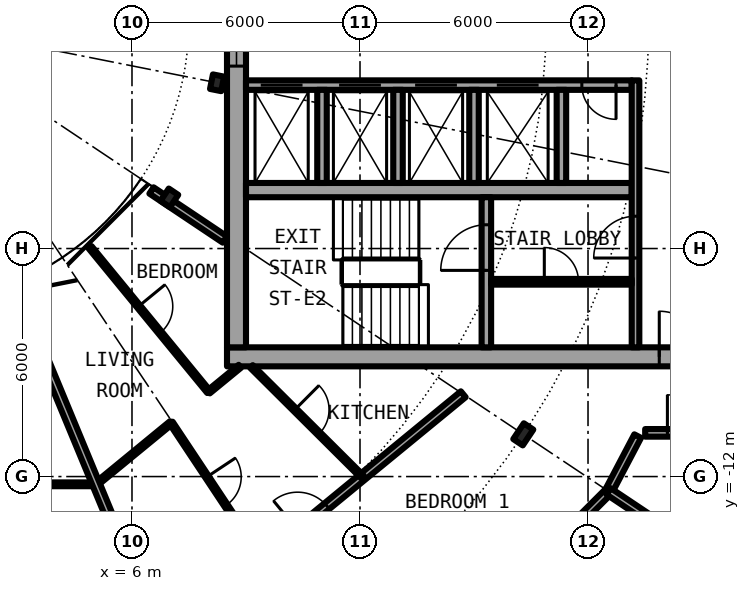
"""IFC4 building model, lengths in metres.
Left out: names, types, materials, properties, quantities, classifications, styles, units other than length and angle.
Written with IfcOpenShell. Run it as: python <this file> out.ifc"""

import sys

from ifc_helpers import new_model, si_unit, direction, frame, frame_2d, origin, origin_2d, place, context, subcontext, project, spatial, rectangle, i_section, extrude, element, fill, save


model = new_model("IFC4")
c1 = context("Model", 3, precision=1e-05, world=origin(), true_north=direction((0.0, 1.0)))
c2 = subcontext(c1, "Body", "Model", "MODEL_VIEW")
j1 = project(units=[si_unit("LENGTHUNIT", "METRE"), si_unit("PLANEANGLEUNIT", "RADIAN")], contexts=[c1])
p1 = place(None, origin())
s1 = spatial("IfcSite", under=j1, at=p1, CompositionType="ELEMENT")
p2 = place(p1, origin())
s2 = spatial("IfcBuilding", under=s1, at=p2, CompositionType="ELEMENT")
p3 = place(p2, frame((0.0, 0.0, 173.8)))
s3 = spatial("IfcBuildingStorey", under=s2, at=p3, CompositionType="ELEMENT", Elevation=173.8)
p4 = place(p3, frame((16.297, -10.889, 0.0), z_axis=(0.0, 0.0, 1.0), x_axis=(0.831469612303, -0.55557023302, 0.0)))
e1 = element("IfcColumn", 1, at=p4, inside=s3, PredefinedType="COLUMN", context=c2, shape_type="SweptSolid", body=[
    extrude(i_section(OverallWidth=0.3, OverallDepth=0.5, WebThickness=0.014, FlangeThickness=0.028, FilletRadius=0.027, at=origin_2d()), origin(), (0.0, 0.0, 1.0), 3.05),
])
for number, where, z_axis, x_axis in (
    (2, (6.984, -4.667, 0.0), (0.0, 0.0, 1.0), (0.831, -0.556, 0.0)),
    (3, (8.239, -1.639, 0.0), (0.0, 0.0, 1.0), (0.981, -0.195, 0.0)),
):
    element("IfcColumn", number, at=place(p3, frame(where, z_axis=z_axis, x_axis=x_axis)), inside=s3, PredefinedType="COLUMN", context=c2, shape_type="SweptSolid", body=[
        extrude(i_section(OverallWidth=0.3, OverallDepth=0.39, WebThickness=0.011, FlangeThickness=0.019, FilletRadius=0.027, at=origin_2d()), origin(), (0.0, 0.0, 1.0), 3.05),
    ])
p5 = place(p3, frame((8.5, -8.85, 0.0), z_axis=(0.0, 0.0, 1.0), x_axis=(1.0, 0.0, 0.0)))
e4 = element("IfcWall", 4, at=p5, inside=s3, PredefinedType="SHEAR", context=c2, shape_type="SweptSolid", body=[
    extrude(rectangle(XDim=13.6, YDim=0.5, at=frame_2d((6.8, 0.0))), origin(), (0.0, 0.0, 1.0), 3.05),
])
p6 = place(p5, frame((11.375, 0.0, 0.0)))
e5 = element("IfcOpeningElement", 5, at=p6, cuts=e4, PredefinedType="OPENING", context=c2, shape_type="SweptSolid", body=[
    extrude(rectangle(XDim=1.2, YDim=2.3, at=frame_2d((0.6, 1.15))), frame((0.0, 0.26, 0.0), z_axis=(0.0, -1.0, 0.0), x_axis=(1.0, 0.0, 0.0)), (0.0, 0.0, 1.0), 0.52),
])
p7 = place(p3, frame((8.75, -8.6, 0.0), z_axis=(0.0, 0.0, 1.0), x_axis=(0.0, 1.0, 0.0)))
e6 = element("IfcWall", 6, at=p7, inside=s3, PredefinedType="SHEAR", context=c2, shape_type="SweptSolid", body=[
    extrude(rectangle(XDim=17.2, YDim=0.5, at=frame_2d((8.6, 0.0))), origin(), (0.0, 0.0, 1.0), 3.05),
])
p8 = place(p7, frame((7.4, 0.0, 0.1)))
e7 = element("IfcOpeningElement", 7, at=p8, cuts=e6, PredefinedType="OPENING", context=c2, shape_type="SweptSolid", body=[
    extrude(rectangle(XDim=2.4, YDim=2.2, at=frame_2d((1.2, 1.1))), frame((0.0, 0.26, 0.0), z_axis=(0.0, -1.0, 0.0), x_axis=(1.0, 0.0, 0.0)), (0.0, 0.0, 1.0), 0.52),
])
p9 = place(p3, frame((19.15, -1.7, 0.0), z_axis=(0.0, 0.0, 1.0), x_axis=(-1.0, 0.0, 0.0)))
e8 = element("IfcWall", 8, at=p9, inside=s3, PredefinedType="SHEAR", context=c2, shape_type="SweptSolid", body=[
    extrude(rectangle(XDim=10.15, YDim=0.25, at=frame_2d((5.075, 0.0))), origin(), (0.0, 0.0, 1.0), 3.05),
])
p10 = place(p9, frame((8.663, 0.0, 0.0)))
e9 = element("IfcOpeningElement", 9, at=p10, cuts=e8, PredefinedType="OPENING", context=c2, shape_type="SweptSolid", body=[
    extrude(rectangle(XDim=1.1, YDim=2.3, at=frame_2d((0.55, 1.15))), frame((0.0, 0.135, 0.0), z_axis=(0.0, -1.0, 0.0), x_axis=(1.0, 0.0, 0.0)), (0.0, 0.0, 1.0), 0.27),
])
p11 = place(p9, frame((6.6, 0.0, 0.0)))
e10 = element("IfcOpeningElement", 10, at=p11, cuts=e8, PredefinedType="OPENING", context=c2, shape_type="SweptSolid", body=[
    extrude(rectangle(XDim=1.1, YDim=2.3, at=frame_2d((0.55, 1.15))), frame((0.0, 0.135, 0.0), z_axis=(0.0, -1.0, 0.0), x_axis=(1.0, 0.0, 0.0)), (0.0, 0.0, 1.0), 0.27),
])
p12 = place(p9, frame((4.6, 0.0, 0.0)))
e11 = element("IfcOpeningElement", 11, at=p12, cuts=e8, PredefinedType="OPENING", context=c2, shape_type="SweptSolid", body=[
    extrude(rectangle(XDim=1.1, YDim=2.3, at=frame_2d((0.55, 1.15))), frame((0.0, 0.135, 0.0), z_axis=(0.0, -1.0, 0.0), x_axis=(1.0, 0.0, 0.0)), (0.0, 0.0, 1.0), 0.27),
])
p13 = place(p9, frame((2.45, 0.0, 0.0)))
e12 = element("IfcOpeningElement", 12, at=p13, cuts=e8, PredefinedType="OPENING", context=c2, shape_type="SweptSolid", body=[
    extrude(rectangle(XDim=1.1, YDim=2.3, at=frame_2d((0.55, 1.15))), frame((0.0, 0.135, 0.0), z_axis=(0.0, -1.0, 0.0), x_axis=(1.0, 0.0, 0.0)), (0.0, 0.0, 1.0), 0.27),
])
p14 = place(p9, frame((0.413, 0.0, 0.0)))
e13 = element("IfcOpeningElement", 13, at=p14, cuts=e8, PredefinedType="OPENING", context=c2, shape_type="SweptSolid", body=[
    extrude(rectangle(XDim=0.9, YDim=2.3, at=frame_2d((0.45, 1.15))), frame((0.0, 0.135, 0.0), z_axis=(0.0, -1.0, 0.0), x_axis=(1.0, 0.0, 0.0)), (0.0, 0.0, 1.0), 0.27),
])
p15 = place(p3, frame((9.0, -4.462, 0.0), z_axis=(0.0, 0.0, 1.0), x_axis=(1.0, 0.0, 0.0)))
e14 = element("IfcWall", 14, at=p15, inside=s3, PredefinedType="SHEAR", context=c2, shape_type="SweptSolid", body=[
    extrude(rectangle(XDim=10.15, YDim=0.375, at=frame_2d((5.075, 0.0))), origin(), (0.0, 0.0, 1.0), 3.05),
])
p16 = place(p3, frame((15.325, -8.6, 0.0), z_axis=(0.0, 0.0, 1.0), x_axis=(0.0, 1.0, 0.0)))
e15 = element("IfcWall", 15, at=p16, inside=s3, PredefinedType="SHEAR", context=c2, shape_type="SweptSolid", body=[
    extrude(rectangle(XDim=3.95, YDim=0.25, at=frame_2d((1.975, 0.0))), origin(), (0.0, 0.0, 1.0), 3.05),
])
p17 = place(p16, frame((2.025, 0.0, 0.0)))
e16 = element("IfcOpeningElement", 16, at=p17, cuts=e15, PredefinedType="OPENING", context=c2, shape_type="SweptSolid", body=[
    extrude(rectangle(XDim=1.2, YDim=2.3, at=frame_2d((0.6, 1.15))), frame((0.0, 0.135, 0.0), z_axis=(0.0, -1.0, 0.0), x_axis=(1.0, 0.0, 0.0)), (0.0, 0.0, 1.0), 0.27),
])
for number, where, z_axis, x_axis in (
    (17, (15.0, -1.825, 0.0), (0.0, 0.0, 1.0), (0.0, -1.0, 0.0)),
    (18, (17.3, -1.825, 0.0), (0.0, 0.0, 1.0), (0.0, -1.0, 0.0)),
):
    element("IfcWall", number, at=place(p3, frame(where, z_axis=z_axis, x_axis=x_axis)), inside=s3, PredefinedType="SOLIDWALL", context=c2, shape_type="SweptSolid", body=[
        extrude(rectangle(XDim=2.45, YDim=0.25, at=frame_2d((1.225, 0.0))), origin(), (0.0, 0.0, 1.0), 2.7),
    ])
p18 = place(p3, frame((19.25, -8.6, 0.0), z_axis=(0.0, 0.0, 1.0), x_axis=(0.0, 1.0, 0.0)))
e19 = element("IfcWall", 19, at=p18, inside=s3, PredefinedType="SOLIDWALL", context=c2, shape_type="SweptSolid", body=[
    extrude(rectangle(XDim=7.025, YDim=0.2, at=frame_2d((3.513, 0.0))), origin(), (0.0, 0.0, 1.0), 2.7),
])
p19 = place(p18, frame((2.35, 0.0, 0.0)))
e20 = element("IfcOpeningElement", 20, at=p19, cuts=e19, PredefinedType="OPENING", context=c2, shape_type="SweptSolid", body=[
    extrude(rectangle(XDim=1.1, YDim=2.3, at=frame_2d((0.55, 1.15))), frame((0.0, 0.11, 0.0), z_axis=(0.0, -1.0, 0.0), x_axis=(1.0, 0.0, 0.0)), (0.0, 0.0, 1.0), 0.22),
])
for number, where, z_axis, x_axis in (
    (21, (11.0, -1.825, 0.0), (0.0, 0.0, 1.0), (0.0, -1.0, 0.0)),
    (22, (13.0, -1.825, 0.0), (0.0, 0.0, 1.0), (0.0, -1.0, 0.0)),
):
    element("IfcWall", number, at=place(p3, frame(where, z_axis=z_axis, x_axis=x_axis)), inside=s3, PredefinedType="SOLIDWALL", context=c2, shape_type="SweptSolid", body=[
        extrude(rectangle(XDim=2.45, YDim=0.25, at=frame_2d((1.225, 0.0))), origin(), (0.0, 0.0, 1.0), 2.7),
    ])
p20 = place(p3, frame((15.45, -6.875, 0.0), z_axis=(0.0, 0.0, 1.0), x_axis=(1.0, 0.0, 0.0)))
e23 = element("IfcWall", 23, at=p20, inside=s3, PredefinedType="PARTITIONING", context=c2, shape_type="SweptSolid", body=[
    extrude(rectangle(XDim=3.7, YDim=0.15, at=frame_2d((1.85, 0.0))), origin(), (0.0, 0.0, 1.0), 2.7),
])
p21 = place(p20, frame((1.4, 0.0, 0.0)))
e24 = element("IfcOpeningElement", 24, at=p21, cuts=e23, PredefinedType="OPENING", context=c2, shape_type="SweptSolid", body=[
    extrude(rectangle(XDim=0.9, YDim=2.3, at=frame_2d((0.45, 1.15))), frame((0.0, 0.085, 0.0), z_axis=(0.0, -1.0, 0.0), x_axis=(1.0, 0.0, 0.0)), (0.0, 0.0, 1.0), 0.17),
])
p22 = place(p3, frame((18.542, -12.389, 0.0), z_axis=(0.0, 0.0, 1.0), x_axis=(0.465605550524, 0.884992356646, 0.0)))
e25 = element("IfcWall", 25, at=p22, inside=s3, PredefinedType="PARTITIONING", context=c2, shape_type="SweptSolid", body=[
    extrude(rectangle(XDim=1.643, YDim=0.2, at=frame_2d((0.821, 0.0))), origin(), (0.0, 0.0, 1.0), 2.7),
])
p23 = place(p3, frame((12.389, -18.542, 0.0), z_axis=(0.0, 0.0, 1.0), x_axis=(0.707106781187, 0.707106781187, 0.0)))
e26 = element("IfcWall", 26, at=p23, inside=s3, PredefinedType="PARTITIONING", context=c2, shape_type="SweptSolid", body=[
    extrude(rectangle(XDim=8.702, YDim=0.2, at=frame_2d((4.351, 0.0))), origin(), (0.0, 0.0, 1.0), 2.7),
])
p24 = place(p23, frame((4.938, 0.0, 0.0)))
e27 = element("IfcOpeningElement", 27, at=p24, cuts=e26, PredefinedType="OPENING", context=c2, shape_type="SweptSolid", body=[
    extrude(rectangle(XDim=1.0, YDim=2.3, at=frame_2d((0.5, 1.15))), frame((0.0, 0.11, 0.0), z_axis=(0.0, -1.0, 0.0), x_axis=(1.0, 0.0, 0.0)), (0.0, 0.0, 1.0), 0.22),
])
p25 = place(p3, frame((6.773, -16.353, 0.0), z_axis=(0.0, 0.0, 1.0), x_axis=(0.773034536097, 0.634363938131, 0.0)))
e28 = element("IfcWall", 28, at=p25, inside=s3, PredefinedType="PARTITIONING", context=c2, shape_type="SweptSolid", body=[
    extrude(rectangle(XDim=10.277, YDim=0.2, at=frame_2d((5.138, 0.0))), origin(), (0.0, 0.0, 1.0), 2.7),
])
p26 = place(p25, frame((4.638, 0.0, 0.0)))
e29 = element("IfcOpeningElement", 29, at=p26, cuts=e28, PredefinedType="OPENING", context=c2, shape_type="SweptSolid", body=[
    extrude(rectangle(XDim=1.0, YDim=2.3, at=frame_2d((0.5, 1.15))), frame((0.0, 0.11, 0.0), z_axis=(0.0, -1.0, 0.0), x_axis=(1.0, 0.0, 0.0)), (0.0, 0.0, 1.0), 0.22),
])
p27 = place(p3, frame((5.055, -12.204, 0.0), z_axis=(0.0, 0.0, 1.0), x_axis=(0.772943675046, 0.634474645046, 0.0)))
e30 = element("IfcWall", 30, at=p27, inside=s3, PredefinedType="PARTITIONING", context=c2, shape_type="SweptSolid", body=[
    extrude(rectangle(XDim=2.557, YDim=0.1, at=frame_2d((1.278, 0.0))), origin(), (0.0, 0.0, 1.0), 2.7),
])
p28 = place(p3, frame((8.016, -9.773, 0.0), z_axis=(0.0, 0.0, 1.0), x_axis=(0.7731800648, 0.634186555673, 0.0)))
e31 = element("IfcWall", 31, at=p28, inside=s3, PredefinedType="PARTITIONING", context=c2, shape_type="SweptSolid", body=[
    extrude(rectangle(XDim=1.064, YDim=0.1, at=frame_2d((0.532, 0.0))), origin(), (0.0, 0.0, 1.0), 2.7),
])
p29 = place(p3, frame((2.527, -12.204, 0.0), z_axis=(0.0, 0.0, 1.0), x_axis=(1.0, 0.0, 0.0)))
e32 = element("IfcWall", 32, at=p29, inside=s3, PredefinedType="PARTITIONING", context=c2, shape_type="SweptSolid", body=[
    extrude(rectangle(XDim=2.528, YDim=0.1, at=frame_2d((1.264, 0.0))), origin(), (0.0, 0.0, 1.0), 2.7),
])
p30 = place(p3, frame((19.504, -10.85, 0.0), z_axis=(0.0, 0.0, 1.0), x_axis=(1.0, 0.0, 0.0)))
e33 = element("IfcWall", 33, at=p30, inside=s3, PredefinedType="PARTITIONING", context=c2, shape_type="SweptSolid", body=[
    extrude(rectangle(XDim=2.171, YDim=0.2, at=frame_2d((1.085, 0.0))), origin(), (0.0, 0.0, 1.0), 2.7),
])
p31 = place(p30, frame((0.585, 0.0, 0.0)))
e34 = element("IfcOpeningElement", 34, at=p31, cuts=e33, PredefinedType="OPENING", context=c2, shape_type="SweptSolid", body=[
    extrude(rectangle(XDim=1.0, YDim=2.3, at=frame_2d((0.5, 1.15))), frame((0.0, 0.11, 0.0), z_axis=(0.0, -1.0, 0.0), x_axis=(1.0, 0.0, 0.0)), (0.0, 0.0, 1.0), 0.22),
])
p32 = place(p3, frame((6.513, -4.472, 0.0), z_axis=(0.0, 0.0, 1.0), x_axis=(0.83133816625, -0.555766905579, 0.0)))
e35 = element("IfcWall", 35, at=p32, inside=s3, PredefinedType="PARTITIONING", context=c2, shape_type="SweptSolid", body=[
    extrude(rectangle(XDim=2.323, YDim=0.2, at=frame_2d((1.162, 0.0))), origin(), (0.0, 0.0, 1.0), 2.7),
])
p33 = place(p3, frame((2.955, -7.132, 0.0), z_axis=(0.0, 0.0, 1.0), x_axis=(0.382750767534, -0.923851638496, 0.0)))
e36 = element("IfcWall", 36, at=p33, inside=s3, PredefinedType="PARTITIONING", context=c2, shape_type="SweptSolid", body=[
    extrude(rectangle(XDim=9.98, YDim=0.2, at=frame_2d((4.99, 0.0))), origin(), (0.0, 0.0, 1.0), 2.7),
])
p34 = place(p3, frame((4.898, -5.968, 0.0), z_axis=(0.0, 0.0, 1.0), x_axis=(0.634401778971, -0.773003481776, 0.0)))
e37 = element("IfcWall", 37, at=p34, inside=s3, PredefinedType="PARTITIONING", context=c2, shape_type="SweptSolid", body=[
    extrude(rectangle(XDim=4.92, YDim=0.1, at=frame_2d((2.46, 0.0))), origin(), (0.0, 0.0, 1.0), 2.7),
])
p35 = place(p34, frame((2.01, 0.0, 0.0)))
e38 = element("IfcOpeningElement", 38, at=p35, cuts=e37, PredefinedType="OPENING", context=c2, shape_type="SweptSolid", body=[
    extrude(rectangle(XDim=0.9, YDim=2.3, at=frame_2d((0.45, 1.15))), frame((0.0, 0.06, 0.0), z_axis=(0.0, -1.0, 0.0), x_axis=(1.0, 0.0, 0.0)), (0.0, 0.0, 1.0), 0.12),
])
p36 = place(p3, frame((7.028, -10.584, 0.0), z_axis=(0.0, 0.0, 1.0), x_axis=(0.553303732327, -0.832979579457, 0.0)))
e39 = element("IfcWall", 39, at=p36, inside=s3, PredefinedType="PARTITIONING", context=c2, shape_type="SweptSolid", body=[
    extrude(rectangle(XDim=4.319, YDim=0.1, at=frame_2d((2.16, 0.0))), origin(), (0.0, 0.0, 1.0), 2.7),
])
p37 = place(p36, frame((1.71, 0.0, 0.0)))
e40 = element("IfcOpeningElement", 40, at=p37, cuts=e39, PredefinedType="OPENING", context=c2, shape_type="SweptSolid", body=[
    extrude(rectangle(XDim=0.9, YDim=2.3, at=frame_2d((0.45, 1.15))), frame((0.0, 0.06, 0.0), z_axis=(0.0, -1.0, 0.0), x_axis=(1.0, 0.0, 0.0)), (0.0, 0.0, 1.0), 0.12),
])
p38 = place(p3, frame((9.144, -9.104, 0.0), z_axis=(0.0, 0.0, 1.0), x_axis=(0.708793214553, -0.705416316088, 0.0)))
e41 = element("IfcWall", 41, at=p38, inside=s3, PredefinedType="PARTITIONING", context=c2, shape_type="SweptSolid", body=[
    extrude(rectangle(XDim=4.121, YDim=0.1, at=frame_2d((2.061, 0.0))), origin(), (0.0, 0.0, 1.0), 2.7),
])
p39 = place(p38, frame((1.611, 0.0, 0.0)))
e42 = element("IfcOpeningElement", 42, at=p39, cuts=e41, PredefinedType="OPENING", context=c2, shape_type="SweptSolid", body=[
    extrude(rectangle(XDim=0.9, YDim=2.3, at=frame_2d((0.45, 1.15))), frame((0.0, 0.06, 0.0), z_axis=(0.0, -1.0, 0.0), x_axis=(1.0, 0.0, 0.0)), (0.0, 0.0, 1.0), 0.12),
])
p40 = place(p3, frame((18.542, -12.389, 0.0), z_axis=(0.0, 0.0, 1.0), x_axis=(0.831387096605, -0.55569370664, 0.0)))
e43 = element("IfcWall", 43, at=p40, inside=s3, PredefinedType="PARTITIONING", context=c2, shape_type="SweptSolid", body=[
    extrude(rectangle(XDim=4.875, YDim=0.2, at=frame_2d((2.438, 0.0))), origin(), (0.0, 0.0, 1.0), 2.7),
])
p41 = place(p10, origin())
e44 = element("IfcDoor", 44, at=p41, inside=s3, OperationType="DOUBLE_DOOR_SLIDING", PredefinedType="DOOR", context=c2, shape_type="SweptSolid", body=[
    extrude(rectangle(XDim=1.1, YDim=2.3, at=frame_2d((0.55, 1.15))), frame((0.0, 0.025, 0.0), z_axis=(0.0, -1.0, 0.0), x_axis=(1.0, 0.0, 0.0)), (0.0, 0.0, 1.0), 0.05),
])
fill(e9, e44)
p42 = place(p11, origin())
e45 = element("IfcDoor", 45, at=p42, inside=s3, OperationType="DOUBLE_DOOR_SLIDING", PredefinedType="DOOR", context=c2, shape_type="SweptSolid", body=[
    extrude(rectangle(XDim=1.1, YDim=2.3, at=frame_2d((0.55, 1.15))), frame((0.0, 0.025, 0.0), z_axis=(0.0, -1.0, 0.0), x_axis=(1.0, 0.0, 0.0)), (0.0, 0.0, 1.0), 0.05),
])
fill(e10, e45)
p43 = place(p12, origin())
e46 = element("IfcDoor", 46, at=p43, inside=s3, OperationType="DOUBLE_DOOR_SLIDING", PredefinedType="DOOR", context=c2, shape_type="SweptSolid", body=[
    extrude(rectangle(XDim=1.1, YDim=2.3, at=frame_2d((0.55, 1.15))), frame((0.0, 0.025, 0.0), z_axis=(0.0, -1.0, 0.0), x_axis=(1.0, 0.0, 0.0)), (0.0, 0.0, 1.0), 0.05),
])
fill(e11, e46)
p44 = place(p13, origin())
e47 = element("IfcDoor", 47, at=p44, inside=s3, OperationType="DOUBLE_DOOR_SLIDING", PredefinedType="DOOR", context=c2, shape_type="SweptSolid", body=[
    extrude(rectangle(XDim=1.1, YDim=2.3, at=frame_2d((0.55, 1.15))), frame((0.0, 0.025, 0.0), z_axis=(0.0, -1.0, 0.0), x_axis=(1.0, 0.0, 0.0)), (0.0, 0.0, 1.0), 0.05),
])
fill(e12, e47)
p45 = place(p14, origin())
e48 = element("IfcDoor", 48, at=p45, inside=s3, OperationType="SINGLE_SWING_RIGHT", PredefinedType="DOOR", context=c2, shape_type="SweptSolid", body=[
    extrude(rectangle(XDim=0.9, YDim=2.3, at=frame_2d((0.45, 1.15))), frame((0.0, 0.025, 0.0), z_axis=(0.0, -1.0, 0.0), x_axis=(1.0, 0.0, 0.0)), (0.0, 0.0, 1.0), 0.05),
])
fill(e13, e48)
p46 = place(p21, origin())
e49 = element("IfcDoor", 49, at=p46, inside=s3, OperationType="SINGLE_SWING_LEFT", PredefinedType="DOOR", context=c2, shape_type="SweptSolid", body=[
    extrude(rectangle(XDim=0.9, YDim=2.3, at=frame_2d((0.45, 1.15))), frame((0.0, 0.025, 0.0), z_axis=(0.0, -1.0, 0.0), x_axis=(1.0, 0.0, 0.0)), (0.0, 0.0, 1.0), 0.05),
])
fill(e24, e49)
p47 = place(p17, origin())
e50 = element("IfcDoor", 50, at=p47, inside=s3, OperationType="SINGLE_SWING_LEFT", PredefinedType="DOOR", context=c2, shape_type="SweptSolid", body=[
    extrude(rectangle(XDim=1.2, YDim=2.3, at=frame_2d((0.6, 1.15))), frame((0.0, 0.025, 0.0), z_axis=(0.0, -1.0, 0.0), x_axis=(1.0, 0.0, 0.0)), (0.0, 0.0, 1.0), 0.05),
])
fill(e16, e50)
p48 = place(p19, origin())
e51 = element("IfcDoor", 51, at=p48, inside=s3, OperationType="SINGLE_SWING_RIGHT", PredefinedType="DOOR", context=c2, shape_type="SweptSolid", body=[
    extrude(rectangle(XDim=1.1, YDim=2.3, at=frame_2d((0.55, 1.15))), frame((0.0, 0.025, 0.0), z_axis=(0.0, -1.0, 0.0), x_axis=(1.0, 0.0, 0.0)), (0.0, 0.0, 1.0), 0.05),
])
fill(e20, e51)
p49 = place(p6, origin())
e52 = element("IfcDoor", 52, at=p49, inside=s3, OperationType="SINGLE_SWING_LEFT", PredefinedType="DOOR", context=c2, shape_type="SweptSolid", body=[
    extrude(rectangle(XDim=1.2, YDim=2.3, at=frame_2d((0.6, 1.15))), frame((0.0, 0.025, 0.0), z_axis=(0.0, -1.0, 0.0), x_axis=(1.0, 0.0, 0.0)), (0.0, 0.0, 1.0), 0.05),
])
fill(e5, e52)
p50 = place(p8, origin())
e53 = element("IfcWindow", 53, at=p50, inside=s3, PartitioningType="SINGLE_PANEL", PredefinedType="WINDOW", context=c2, shape_type="SweptSolid", body=[
    extrude(rectangle(XDim=2.4, YDim=2.2, at=frame_2d((1.2, 1.1))), frame((0.0, 0.03, 0.0), z_axis=(0.0, -1.0, 0.0), x_axis=(1.0, 0.0, 0.0)), (0.0, 0.0, 1.0), 0.06),
])
fill(e7, e53)
p51 = place(p26, origin())
e54 = element("IfcDoor", 54, at=p51, inside=s3, OperationType="SINGLE_SWING_RIGHT", PredefinedType="DOOR", context=c2, shape_type="SweptSolid", body=[
    extrude(rectangle(XDim=1.0, YDim=2.3, at=frame_2d((0.5, 1.15))), frame((0.0, 0.025, 0.0), z_axis=(0.0, -1.0, 0.0), x_axis=(1.0, 0.0, 0.0)), (0.0, 0.0, 1.0), 0.05),
])
fill(e29, e54)
p52 = place(p37, origin())
e55 = element("IfcDoor", 55, at=p52, inside=s3, OperationType="SINGLE_SWING_LEFT", PredefinedType="DOOR", context=c2, shape_type="SweptSolid", body=[
    extrude(rectangle(XDim=0.9, YDim=2.3, at=frame_2d((0.45, 1.15))), frame((0.0, 0.025, 0.0), z_axis=(0.0, -1.0, 0.0), x_axis=(1.0, 0.0, 0.0)), (0.0, 0.0, 1.0), 0.05),
])
fill(e40, e55)
p53 = place(p39, origin())
e56 = element("IfcDoor", 56, at=p53, inside=s3, OperationType="SINGLE_SWING_RIGHT", PredefinedType="DOOR", context=c2, shape_type="SweptSolid", body=[
    extrude(rectangle(XDim=0.9, YDim=2.3, at=frame_2d((0.45, 1.15))), frame((0.0, 0.025, 0.0), z_axis=(0.0, -1.0, 0.0), x_axis=(1.0, 0.0, 0.0)), (0.0, 0.0, 1.0), 0.05),
])
fill(e42, e56)
p54 = place(p35, origin())
e57 = element("IfcDoor", 57, at=p54, inside=s3, OperationType="SINGLE_SWING_RIGHT", PredefinedType="DOOR", context=c2, shape_type="SweptSolid", body=[
    extrude(rectangle(XDim=0.9, YDim=2.3, at=frame_2d((0.45, 1.15))), frame((0.0, 0.025, 0.0), z_axis=(0.0, -1.0, 0.0), x_axis=(1.0, 0.0, 0.0)), (0.0, 0.0, 1.0), 0.05),
])
fill(e38, e57)
p55 = place(p31, origin())
e58 = element("IfcDoor", 58, at=p55, inside=s3, OperationType="SINGLE_SWING_LEFT", PredefinedType="DOOR", context=c2, shape_type="SweptSolid", body=[
    extrude(rectangle(XDim=1.0, YDim=2.3, at=frame_2d((0.5, 1.15))), frame((0.0, 0.025, 0.0), z_axis=(0.0, -1.0, 0.0), x_axis=(1.0, 0.0, 0.0)), (0.0, 0.0, 1.0), 0.05),
])
fill(e34, e58)
save(model, sys.argv[1])
